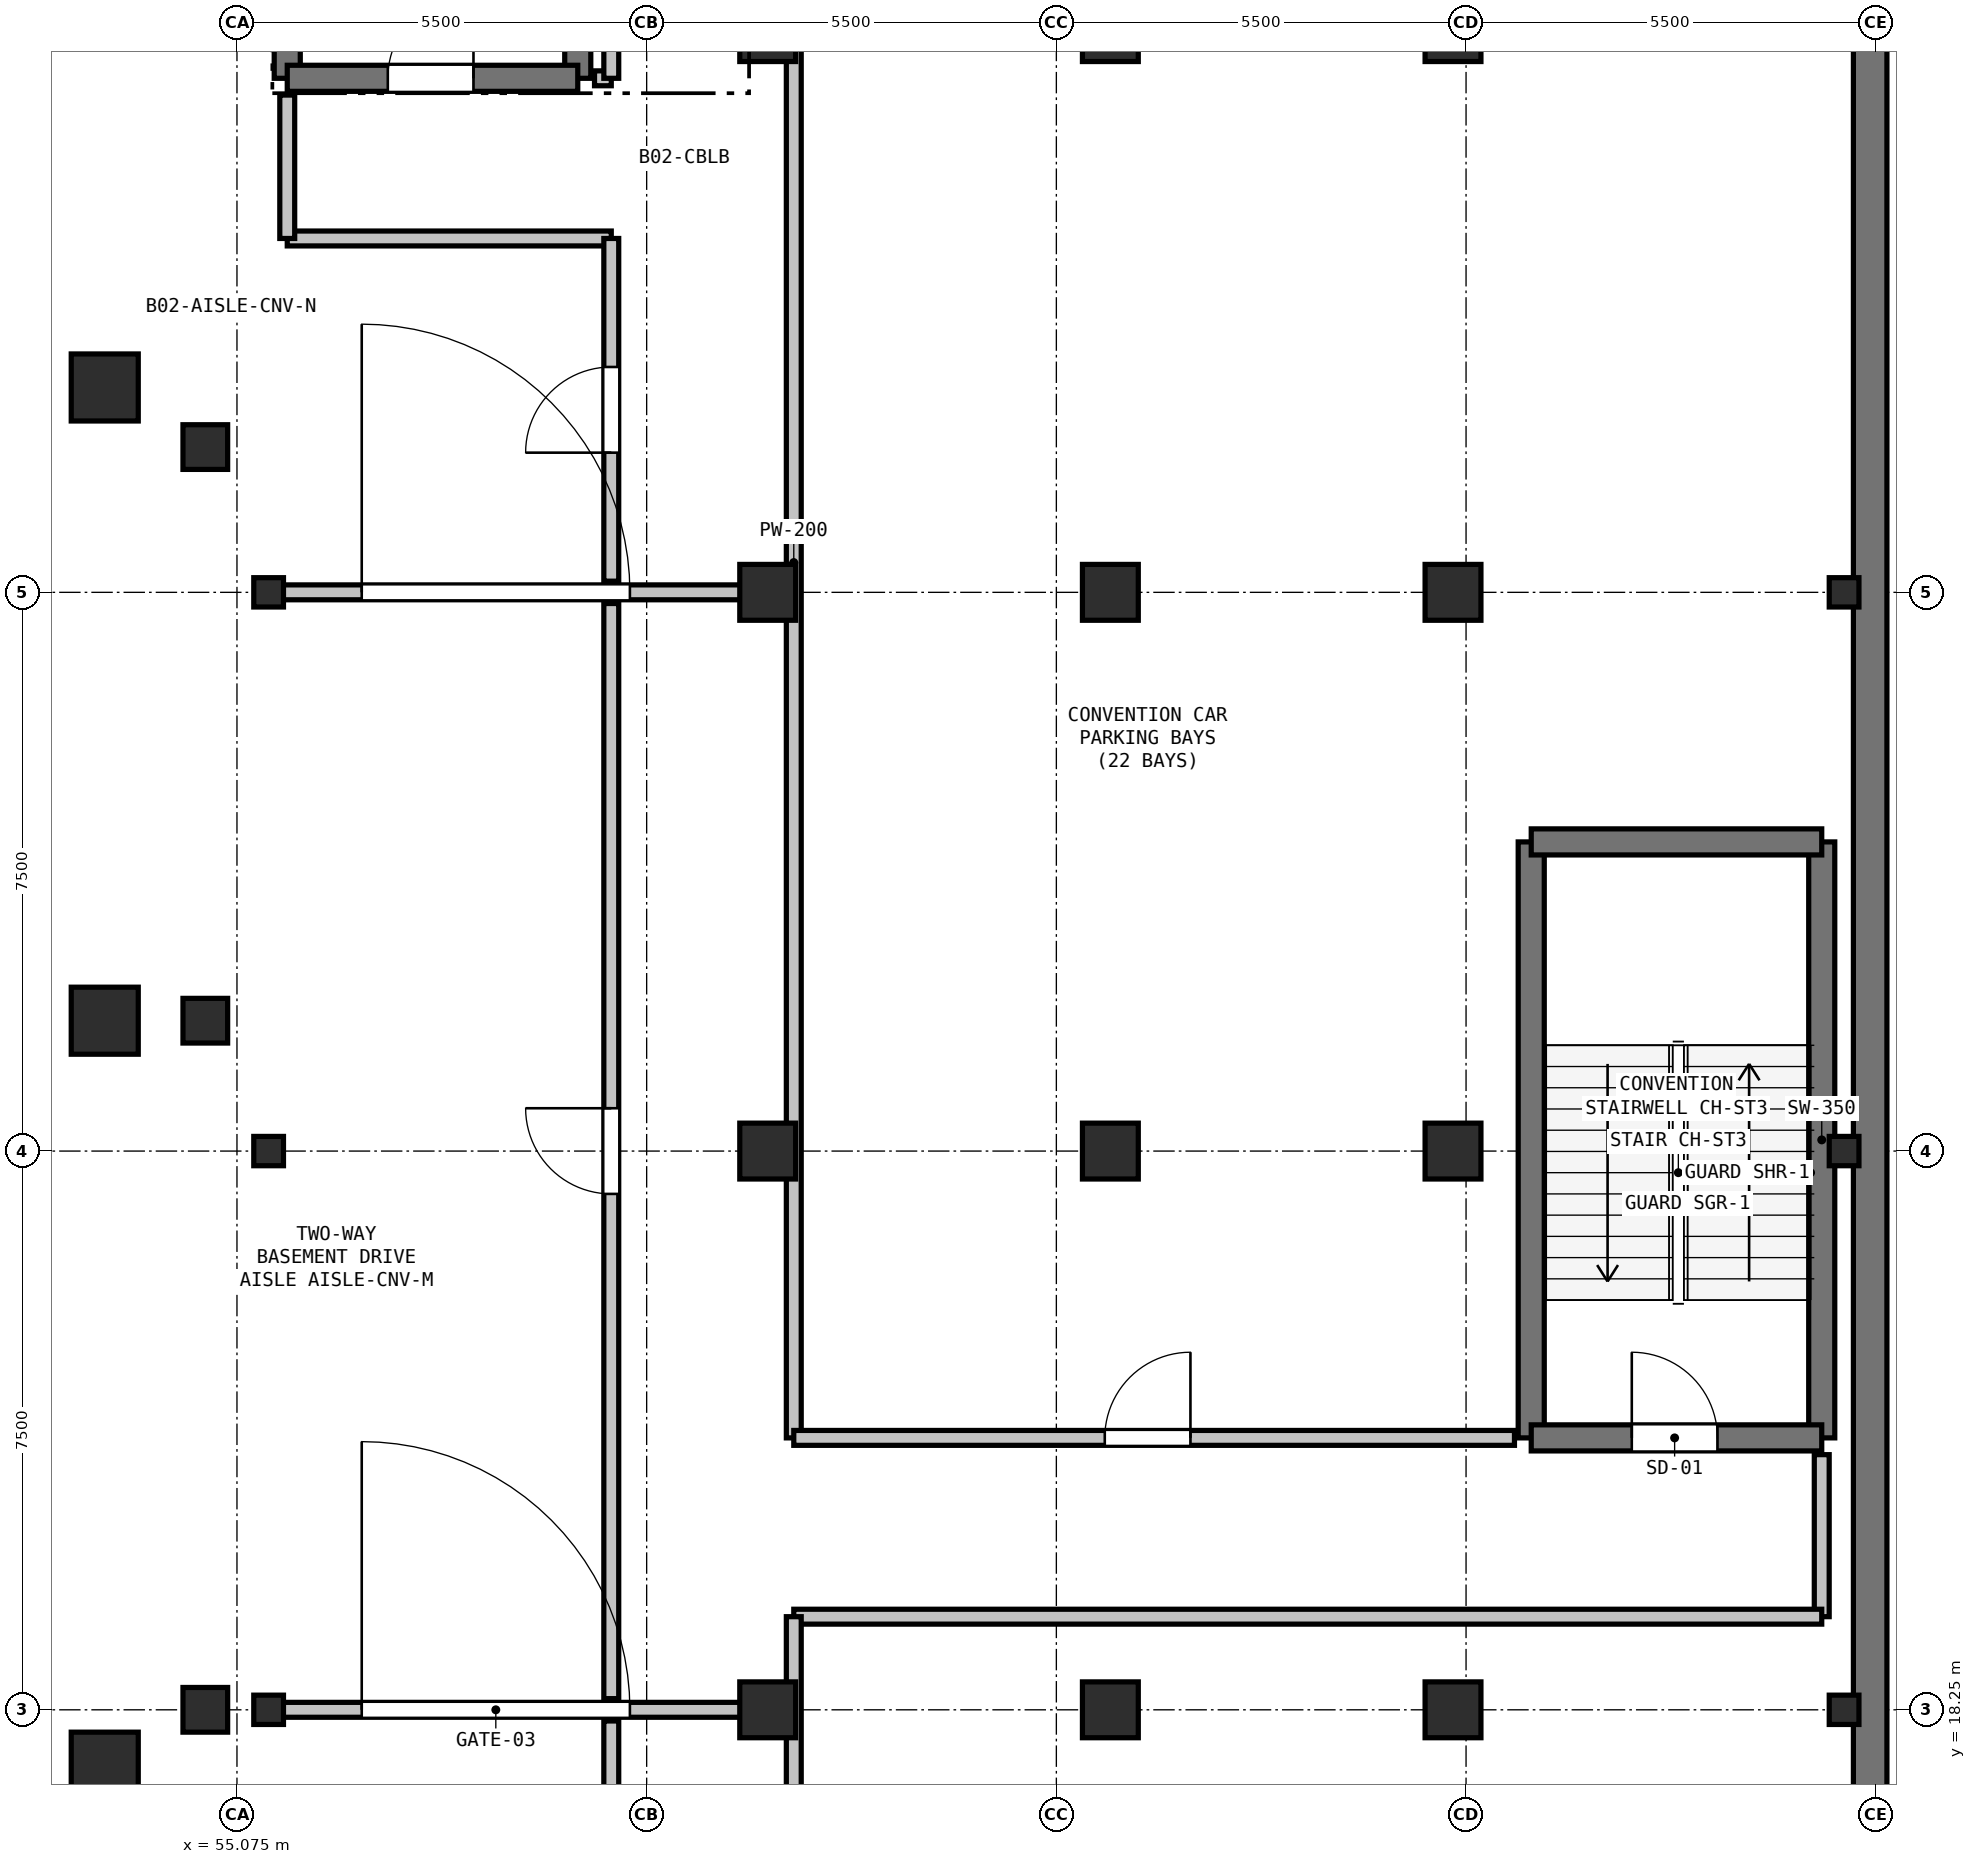
"""IFC4 building model, lengths in metres.
Left out: names, types, materials, properties, quantities, classifications, styles, units other than length and angle.
Written with IfcOpenShell. Run it as: python <this file> out.ifc"""

import sys

from ifc_helpers import new_model, si_unit, direction, frame, frame_2d, origin, origin_2d, place, context, subcontext, project, spatial, rectangle, i_section, extrude, element, fill, save


model = new_model("IFC4")
c1 = context("Model", 3, precision=1e-05, world=origin(), true_north=direction((0.0, 1.0)))
c2 = subcontext(c1, "Body", "Model", "MODEL_VIEW")
j1 = project(units=[si_unit("LENGTHUNIT", "METRE"), si_unit("PLANEANGLEUNIT", "RADIAN")], contexts=[c1])
p1 = place(None, origin())
s1 = spatial("IfcSite", under=j1, at=p1, CompositionType="ELEMENT")
p2 = place(p1, origin())
s2 = spatial("IfcBuilding", under=s1, at=p2, CompositionType="ELEMENT")
p3 = place(p2, frame((0.0, 0.0, -9.0)))
s3 = spatial("IfcBuildingStorey", under=s2, at=p3, CompositionType="ELEMENT", Elevation=-9.0)
p4 = place(p3, frame((77.0, 2.5, 0.0), z_axis=(0.0, 0.0, 1.0), x_axis=(0.0, 1.0, 0.0)))
e1 = element("IfcWall", 1, at=p4, inside=s3, PredefinedType="USERDEFINED", context=c2, shape_type="SweptSolid", body=[
    extrude(rectangle(XDim=48.5, YDim=0.45, at=frame_2d((24.25, 0.0))), origin(), (0.0, 0.0, 1.0), 4.5),
])
for number, where, z_axis, x_axis in (
    (2, (53.3, 17.5, 0.0), (0.0, 0.0, 1.0), (1.0, 0.0, 0.0)),
    (3, (53.3, 27.5, 0.0), (0.0, 0.0, 1.0), (1.0, 0.0, 0.0)),
    (4, (53.3, 36.0, 0.0), (0.0, 0.0, 1.0), (1.0, 0.0, 0.0)),
):
    element("IfcColumn", number, at=place(p3, frame(where, z_axis=z_axis, x_axis=x_axis)), inside=s3, PredefinedType="COLUMN", context=c2, shape_type="SweptSolid", body=[
        extrude(rectangle(XDim=0.9, YDim=0.9, at=origin_2d()), origin(), (0.0, 0.0, 1.0), 4.5),
    ])
for number, where, z_axis, x_axis in (
    (5, (54.65, 18.25, 0.0), (0.0, 0.0, 1.0), (1.0, 0.0, 0.0)),
    (6, (54.65, 27.5, 0.0), (0.0, 0.0, 1.0), (1.0, 0.0, 0.0)),
    (7, (54.65, 35.2, 0.0), (0.0, 0.0, 1.0), (1.0, 0.0, 0.0)),
):
    element("IfcColumn", number, at=place(p3, frame(where, z_axis=z_axis, x_axis=x_axis)), inside=s3, PredefinedType="COLUMN", context=c2, shape_type="SweptSolid", body=[
        extrude(rectangle(XDim=0.6, YDim=0.6, at=origin_2d()), origin(), (0.0, 0.0, 1.0), 4.2),
    ])
for number, where, z_axis, x_axis in (
    (8, (55.5, 18.25, 0.0), (0.0, 0.0, 1.0), (1.0, 0.0, 0.0)),
    (9, (55.5, 25.75, 0.0), (0.0, 0.0, 1.0), (1.0, 0.0, 0.0)),
    (10, (55.5, 33.25, 0.0), (0.0, 0.0, 1.0), (1.0, 0.0, 0.0)),
    (11, (76.65, 18.25, 0.0), (0.0, 0.0, 1.0), (1.0, 0.0, 0.0)),
    (12, (76.65, 25.75, 0.0), (0.0, 0.0, 1.0), (1.0, 0.0, 0.0)),
    (13, (76.65, 33.25, 0.0), (0.0, 0.0, 1.0), (1.0, 0.0, 0.0)),
):
    element("IfcColumn", number, at=place(p3, frame(where, z_axis=z_axis, x_axis=x_axis)), inside=s3, PredefinedType="COLUMN", context=c2, shape_type="SweptSolid", body=[
        extrude(i_section(OverallWidth=0.399, OverallDepth=0.394, WebThickness=0.023, FlangeThickness=0.037, at=origin_2d()), origin(), (0.0, 0.0, 1.0), 4.5),
    ])
for number, where, z_axis, x_axis in (
    (14, (62.2, 18.25, 0.0), (0.0, 0.0, 1.0), (1.0, 0.0, 0.0)),
    (15, (62.2, 25.75, 0.0), (0.0, 0.0, 1.0), (1.0, 0.0, 0.0)),
    (16, (62.2, 33.25, 0.0), (0.0, 0.0, 1.0), (1.0, 0.0, 0.0)),
    (17, (62.2, 40.75, 0.0), (0.0, 0.0, 1.0), (1.0, 0.0, 0.0)),
    (18, (66.8, 18.25, 0.0), (0.0, 0.0, 1.0), (1.0, 0.0, 0.0)),
    (19, (66.8, 25.75, 0.0), (0.0, 0.0, 1.0), (1.0, 0.0, 0.0)),
    (20, (66.8, 33.25, 0.0), (0.0, 0.0, 1.0), (1.0, 0.0, 0.0)),
    (21, (66.8, 40.75, 0.0), (0.0, 0.0, 1.0), (1.0, 0.0, 0.0)),
    (22, (71.4, 18.25, 0.0), (0.0, 0.0, 1.0), (1.0, 0.0, 0.0)),
    (23, (71.4, 25.75, 0.0), (0.0, 0.0, 1.0), (1.0, 0.0, 0.0)),
    (24, (71.4, 33.25, 0.0), (0.0, 0.0, 1.0), (1.0, 0.0, 0.0)),
    (25, (71.4, 40.75, 0.0), (0.0, 0.0, 1.0), (1.0, 0.0, 0.0)),
):
    element("IfcColumn", number, at=place(p3, frame(where, z_axis=z_axis, x_axis=x_axis)), inside=s3, PredefinedType="COLUMN", context=c2, shape_type="SweptSolid", body=[
        extrude(rectangle(XDim=0.75, YDim=0.75, at=origin_2d()), origin(), (0.0, 0.0, 1.0), 4.5),
    ])
for number, where, z_axis, x_axis in (
    (26, (59.65, 48.15, 0.0), (0.0, 0.0, 1.0), (0.0, -1.0, 0.0)),
    (27, (55.75, 40.15, 0.0), (0.0, 0.0, 1.0), (0.0, 1.0, 0.0)),
):
    element("IfcWall", number, at=place(p3, frame(where, z_axis=z_axis, x_axis=x_axis)), inside=s3, PredefinedType="SHEAR", context=c2, shape_type="SweptSolid", body=[
        extrude(rectangle(XDim=8.0, YDim=0.35, at=frame_2d((4.0, 0.0))), origin(), (0.0, 0.0, 1.0), 4.2),
    ])
p5 = place(p3, frame((55.75, 40.15, 0.0), z_axis=(0.0, 0.0, 1.0), x_axis=(1.0, 0.0, 0.0)))
e28 = element("IfcWall", 28, at=p5, inside=s3, PredefinedType="SHEAR", context=c2, shape_type="SweptSolid", body=[
    extrude(rectangle(XDim=3.9, YDim=0.35, at=frame_2d((1.95, 0.0))), origin(), (0.0, 0.0, 1.0), 4.2),
])
p6 = place(p5, frame((1.35, 0.0, 0.0)))
e29 = element("IfcOpeningElement", 29, at=p6, cuts=e28, PredefinedType="OPENING", context=c2, shape_type="SweptSolid", body=[
    extrude(rectangle(XDim=1.15, YDim=2.15, at=frame_2d((0.575, 1.075))), frame((0.0, 0.185, 0.0), z_axis=(0.0, -1.0, 0.0), x_axis=(1.0, 0.0, 0.0)), (0.0, 0.0, 1.0), 0.37),
])
for number, where, z_axis, x_axis in (
    (30, (76.35, 29.9, 0.0), (0.0, 0.0, 1.0), (0.0, -1.0, 0.0)),
    (31, (72.45, 21.9, 0.0), (0.0, 0.0, 1.0), (0.0, 1.0, 0.0)),
):
    element("IfcWall", number, at=place(p3, frame(where, z_axis=z_axis, x_axis=x_axis)), inside=s3, PredefinedType="SHEAR", context=c2, shape_type="SweptSolid", body=[
        extrude(rectangle(XDim=8.0, YDim=0.35, at=frame_2d((4.0, 0.0))), origin(), (0.0, 0.0, 1.0), 4.2),
    ])
p7 = place(p3, frame((72.45, 29.9, 0.0), z_axis=(0.0, 0.0, 1.0), x_axis=(1.0, 0.0, 0.0)))
e32 = element("IfcWall", 32, at=p7, inside=s3, PredefinedType="SHEAR", context=c2, shape_type="SweptSolid", body=[
    extrude(rectangle(XDim=3.9, YDim=0.35, at=frame_2d((1.95, 0.0))), origin(), (0.0, 0.0, 1.0), 4.2),
])
p8 = place(p3, frame((72.45, 21.9, 0.0), z_axis=(0.0, 0.0, 1.0), x_axis=(1.0, 0.0, 0.0)))
e33 = element("IfcWall", 33, at=p8, inside=s3, PredefinedType="SHEAR", context=c2, shape_type="SweptSolid", body=[
    extrude(rectangle(XDim=3.9, YDim=0.35, at=frame_2d((1.95, 0.0))), origin(), (0.0, 0.0, 1.0), 4.2),
])
p9 = place(p8, frame((1.35, 0.0, 0.0)))
e34 = element("IfcOpeningElement", 34, at=p9, cuts=e33, PredefinedType="OPENING", context=c2, shape_type="SweptSolid", body=[
    extrude(rectangle(XDim=1.15, YDim=2.15, at=frame_2d((0.575, 1.075))), frame((0.0, 0.185, 0.0), z_axis=(0.0, -1.0, 0.0), x_axis=(1.0, 0.0, 0.0)), (0.0, 0.0, 1.0), 0.37),
])
p10 = place(p3, frame((55.5, 18.25, 0.0), z_axis=(0.0, 0.0, 1.0), x_axis=(1.0, 0.0, 0.0)))
e35 = element("IfcWall", 35, at=p10, inside=s3, PredefinedType="PARTITIONING", context=c2, shape_type="SweptSolid", body=[
    extrude(rectangle(XDim=6.7, YDim=0.2, at=frame_2d((3.35, 0.0))), origin(), (0.0, 0.0, 1.0), 4.2),
])
p11 = place(p10, frame((1.25, 0.0, 0.0)))
e36 = element("IfcOpeningElement", 36, at=p11, cuts=e35, PredefinedType="OPENING", context=c2, shape_type="SweptSolid", body=[
    extrude(rectangle(XDim=3.6, YDim=2.8, at=frame_2d((1.8, 1.4))), frame((0.0, 0.11, 0.0), z_axis=(0.0, -1.0, 0.0), x_axis=(1.0, 0.0, 0.0)), (0.0, 0.0, 1.0), 0.22),
])
p12 = place(p3, frame((55.5, 33.25, 0.0), z_axis=(0.0, 0.0, 1.0), x_axis=(1.0, 0.0, 0.0)))
e37 = element("IfcWall", 37, at=p12, inside=s3, PredefinedType="PARTITIONING", context=c2, shape_type="SweptSolid", body=[
    extrude(rectangle(XDim=6.7, YDim=0.2, at=frame_2d((3.35, 0.0))), origin(), (0.0, 0.0, 1.0), 4.2),
])
p13 = place(p12, frame((1.25, 0.0, 0.0)))
e38 = element("IfcOpeningElement", 38, at=p13, cuts=e37, PredefinedType="OPENING", context=c2, shape_type="SweptSolid", body=[
    extrude(rectangle(XDim=3.6, YDim=2.8, at=frame_2d((1.8, 1.4))), frame((0.0, 0.11, 0.0), z_axis=(0.0, -1.0, 0.0), x_axis=(1.0, 0.0, 0.0)), (0.0, 0.0, 1.0), 0.22),
])
p14 = place(p3, frame((60.1, 38.0, 0.0), z_axis=(0.0, 0.0, 1.0), x_axis=(-1.0, 0.0, 0.0)))
e39 = element("IfcWall", 39, at=p14, inside=s3, PredefinedType="PARTITIONING", context=c2, shape_type="SweptSolid", body=[
    extrude(rectangle(XDim=4.35, YDim=0.2, at=frame_2d((2.175, 0.0))), origin(), (0.0, 0.0, 1.0), 4.2),
])
p15 = place(p3, frame((55.75, 38.0, 0.0), z_axis=(0.0, 0.0, 1.0), x_axis=(0.0, 1.0, 0.0)))
e40 = element("IfcWall", 40, at=p15, inside=s3, PredefinedType="PARTITIONING", context=c2, shape_type="SweptSolid", body=[
    extrude(rectangle(XDim=1.925, YDim=0.2, at=frame_2d((0.962, 0.0))), origin(), (0.0, 0.0, 1.0), 4.2),
])
p16 = place(p3, frame((59.875, 40.15, 0.0), z_axis=(0.0, 0.0, 1.0), x_axis=(1.0, 0.0, 0.0)))
e41 = element("IfcWall", 41, at=p16, inside=s3, PredefinedType="PARTITIONING", context=c2, shape_type="SweptSolid", body=[
    extrude(rectangle(XDim=0.225, YDim=0.2, at=frame_2d((0.113, 0.0))), origin(), (0.0, 0.0, 1.0), 4.2),
])
p17 = place(p3, frame((60.1, 40.15, 0.0), z_axis=(0.0, 0.0, 1.0), x_axis=(0.0, 1.0, 0.0)))
e42 = element("IfcWall", 42, at=p17, inside=s3, PredefinedType="PARTITIONING", context=c2, shape_type="SweptSolid", body=[
    extrude(rectangle(XDim=2.025, YDim=0.2, at=frame_2d((1.013, 0.0))), origin(), (0.0, 0.0, 1.0), 4.2),
])
p18 = place(p3, frame((62.55, 45.4, 0.0), z_axis=(0.0, 0.0, 1.0), x_axis=(0.0, -1.0, 0.0)))
e43 = element("IfcWall", 43, at=p18, inside=s3, PredefinedType="PARTITIONING", context=c2, shape_type="SweptSolid", body=[
    extrude(rectangle(XDim=23.5, YDim=0.2, at=frame_2d((11.75, 0.0))), origin(), (0.0, 0.0, 1.0), 4.2),
])
p19 = place(p3, frame((62.55, 21.9, 0.0), z_axis=(0.0, 0.0, 1.0), x_axis=(1.0, 0.0, 0.0)))
e44 = element("IfcWall", 44, at=p19, inside=s3, PredefinedType="PARTITIONING", context=c2, shape_type="SweptSolid", body=[
    extrude(rectangle(XDim=9.675, YDim=0.2, at=frame_2d((4.837, 0.0))), origin(), (0.0, 0.0, 1.0), 4.2),
])
p20 = place(p19, frame((4.175, 0.0, 0.0)))
e45 = element("IfcOpeningElement", 45, at=p20, cuts=e44, PredefinedType="OPENING", context=c2, shape_type="SweptSolid", body=[
    extrude(rectangle(XDim=1.15, YDim=2.15, at=frame_2d((0.575, 1.075))), frame((0.0, 0.11, 0.0), z_axis=(0.0, -1.0, 0.0), x_axis=(1.0, 0.0, 0.0)), (0.0, 0.0, 1.0), 0.22),
])
p21 = place(p3, frame((76.35, 21.675, 0.0), z_axis=(0.0, 0.0, 1.0), x_axis=(0.0, -1.0, 0.0)))
e46 = element("IfcWall", 46, at=p21, inside=s3, PredefinedType="PARTITIONING", context=c2, shape_type="SweptSolid", body=[
    extrude(rectangle(XDim=2.175, YDim=0.2, at=frame_2d((1.087, 0.0))), origin(), (0.0, 0.0, 1.0), 4.2),
])
p22 = place(p3, frame((76.35, 19.5, 0.0), z_axis=(0.0, 0.0, 1.0), x_axis=(-1.0, 0.0, 0.0)))
e47 = element("IfcWall", 47, at=p22, inside=s3, PredefinedType="PARTITIONING", context=c2, shape_type="SweptSolid", body=[
    extrude(rectangle(XDim=13.8, YDim=0.2, at=frame_2d((6.9, 0.0))), origin(), (0.0, 0.0, 1.0), 4.2),
])
p23 = place(p3, frame((62.55, 19.5, 0.0), z_axis=(0.0, 0.0, 1.0), x_axis=(0.0, -1.0, 0.0)))
e48 = element("IfcWall", 48, at=p23, inside=s3, PredefinedType="PARTITIONING", context=c2, shape_type="SweptSolid", body=[
    extrude(rectangle(XDim=13.6, YDim=0.2, at=frame_2d((6.8, 0.0))), origin(), (0.0, 0.0, 1.0), 4.2),
])
p24 = place(p3, frame((60.1, 13.5, 0.0), z_axis=(0.0, 0.0, 1.0), x_axis=(0.0, 1.0, 0.0)))
e49 = element("IfcWall", 49, at=p24, inside=s3, PredefinedType="PARTITIONING", context=c2, shape_type="SweptSolid", body=[
    extrude(rectangle(XDim=4.6, YDim=0.2, at=frame_2d((2.3, 0.0))), origin(), (0.0, 0.0, 1.0), 4.2),
])
p25 = place(p24, frame((1.725, 0.0, 0.0)))
e50 = element("IfcOpeningElement", 50, at=p25, cuts=e49, PredefinedType="OPENING", context=c2, shape_type="SweptSolid", body=[
    extrude(rectangle(XDim=1.15, YDim=2.15, at=frame_2d((0.575, 1.075))), frame((0.0, 0.11, 0.0), z_axis=(0.0, -1.0, 0.0), x_axis=(1.0, 0.0, 0.0)), (0.0, 0.0, 1.0), 0.22),
])
p26 = place(p3, frame((60.1, 18.4, 0.0), z_axis=(0.0, 0.0, 1.0), x_axis=(0.0, 1.0, 0.0)))
e51 = element("IfcWall", 51, at=p26, inside=s3, PredefinedType="PARTITIONING", context=c2, shape_type="SweptSolid", body=[
    extrude(rectangle(XDim=14.7, YDim=0.2, at=frame_2d((7.35, 0.0))), origin(), (0.0, 0.0, 1.0), 4.2),
])
p27 = place(p26, frame((6.775, 0.0, 0.0)))
e52 = element("IfcOpeningElement", 52, at=p27, cuts=e51, PredefinedType="OPENING", context=c2, shape_type="SweptSolid", body=[
    extrude(rectangle(XDim=1.15, YDim=2.15, at=frame_2d((0.575, 1.075))), frame((0.0, 0.11, 0.0), z_axis=(0.0, -1.0, 0.0), x_axis=(1.0, 0.0, 0.0)), (0.0, 0.0, 1.0), 0.22),
])
p28 = place(p3, frame((60.1, 33.4, 0.0), z_axis=(0.0, 0.0, 1.0), x_axis=(0.0, 1.0, 0.0)))
e53 = element("IfcWall", 53, at=p28, inside=s3, PredefinedType="PARTITIONING", context=c2, shape_type="SweptSolid", body=[
    extrude(rectangle(XDim=4.6, YDim=0.2, at=frame_2d((2.3, 0.0))), origin(), (0.0, 0.0, 1.0), 4.2),
])
p29 = place(p28, frame((1.725, 0.0, 0.0)))
e54 = element("IfcOpeningElement", 54, at=p29, cuts=e53, PredefinedType="OPENING", context=c2, shape_type="SweptSolid", body=[
    extrude(rectangle(XDim=1.15, YDim=2.15, at=frame_2d((0.575, 1.075))), frame((0.0, 0.11, 0.0), z_axis=(0.0, -1.0, 0.0), x_axis=(1.0, 0.0, 0.0)), (0.0, 0.0, 1.0), 0.22),
])
p30 = place(p6, origin())
e55 = element("IfcDoor", 55, at=p30, inside=s3, OperationType="SINGLE_SWING_RIGHT", PredefinedType="DOOR", context=c2, shape_type="SweptSolid", body=[
    extrude(rectangle(XDim=1.15, YDim=2.15, at=frame_2d((0.575, 1.075))), frame((0.0, 0.025, 0.0), z_axis=(0.0, -1.0, 0.0), x_axis=(1.0, 0.0, 0.0)), (0.0, 0.0, 1.0), 0.05),
])
fill(e29, e55)
p31 = place(p9, origin())
e56 = element("IfcDoor", 56, at=p31, inside=s3, OperationType="SINGLE_SWING_LEFT", PredefinedType="DOOR", context=c2, shape_type="SweptSolid", body=[
    extrude(rectangle(XDim=1.15, YDim=2.15, at=frame_2d((0.575, 1.075))), frame((0.0, 0.025, 0.0), z_axis=(0.0, -1.0, 0.0), x_axis=(1.0, 0.0, 0.0)), (0.0, 0.0, 1.0), 0.05),
])
fill(e34, e56)
p32 = place(p11, origin())
e57 = element("IfcDoor", 57, at=p32, inside=s3, OperationType="ROLLINGUP", PredefinedType="GATE", context=c2, shape_type="SweptSolid", body=[
    extrude(rectangle(XDim=3.6, YDim=2.8, at=frame_2d((1.8, 1.4))), frame((0.0, 0.025, 0.0), z_axis=(0.0, -1.0, 0.0), x_axis=(1.0, 0.0, 0.0)), (0.0, 0.0, 1.0), 0.05),
])
fill(e36, e57)
p33 = place(p13, origin())
e58 = element("IfcDoor", 58, at=p33, inside=s3, OperationType="ROLLINGUP", PredefinedType="GATE", context=c2, shape_type="SweptSolid", body=[
    extrude(rectangle(XDim=3.6, YDim=2.8, at=frame_2d((1.8, 1.4))), frame((0.0, 0.025, 0.0), z_axis=(0.0, -1.0, 0.0), x_axis=(1.0, 0.0, 0.0)), (0.0, 0.0, 1.0), 0.05),
])
fill(e38, e58)
p34 = place(p27, origin())
e59 = element("IfcDoor", 59, at=p34, inside=s3, OperationType="SINGLE_SWING_RIGHT", PredefinedType="DOOR", context=c2, shape_type="SweptSolid", body=[
    extrude(rectangle(XDim=1.15, YDim=2.15, at=frame_2d((0.575, 1.075))), frame((0.0, 0.025, 0.0), z_axis=(0.0, -1.0, 0.0), x_axis=(1.0, 0.0, 0.0)), (0.0, 0.0, 1.0), 0.05),
])
fill(e52, e59)
p35 = place(p29, origin())
e60 = element("IfcDoor", 60, at=p35, inside=s3, OperationType="SINGLE_SWING_LEFT", PredefinedType="DOOR", context=c2, shape_type="SweptSolid", body=[
    extrude(rectangle(XDim=1.15, YDim=2.15, at=frame_2d((0.575, 1.075))), frame((0.0, 0.025, 0.0), z_axis=(0.0, -1.0, 0.0), x_axis=(1.0, 0.0, 0.0)), (0.0, 0.0, 1.0), 0.05),
])
fill(e54, e60)
p36 = place(p20, origin())
e61 = element("IfcDoor", 61, at=p36, inside=s3, OperationType="SINGLE_SWING_RIGHT", PredefinedType="DOOR", context=c2, shape_type="SweptSolid", body=[
    extrude(rectangle(XDim=1.15, YDim=2.15, at=frame_2d((0.575, 1.075))), frame((0.0, 0.025, 0.0), z_axis=(0.0, -1.0, 0.0), x_axis=(1.0, 0.0, 0.0)), (0.0, 0.0, 1.0), 0.05),
])
fill(e45, e61)
save(model, sys.argv[1])
